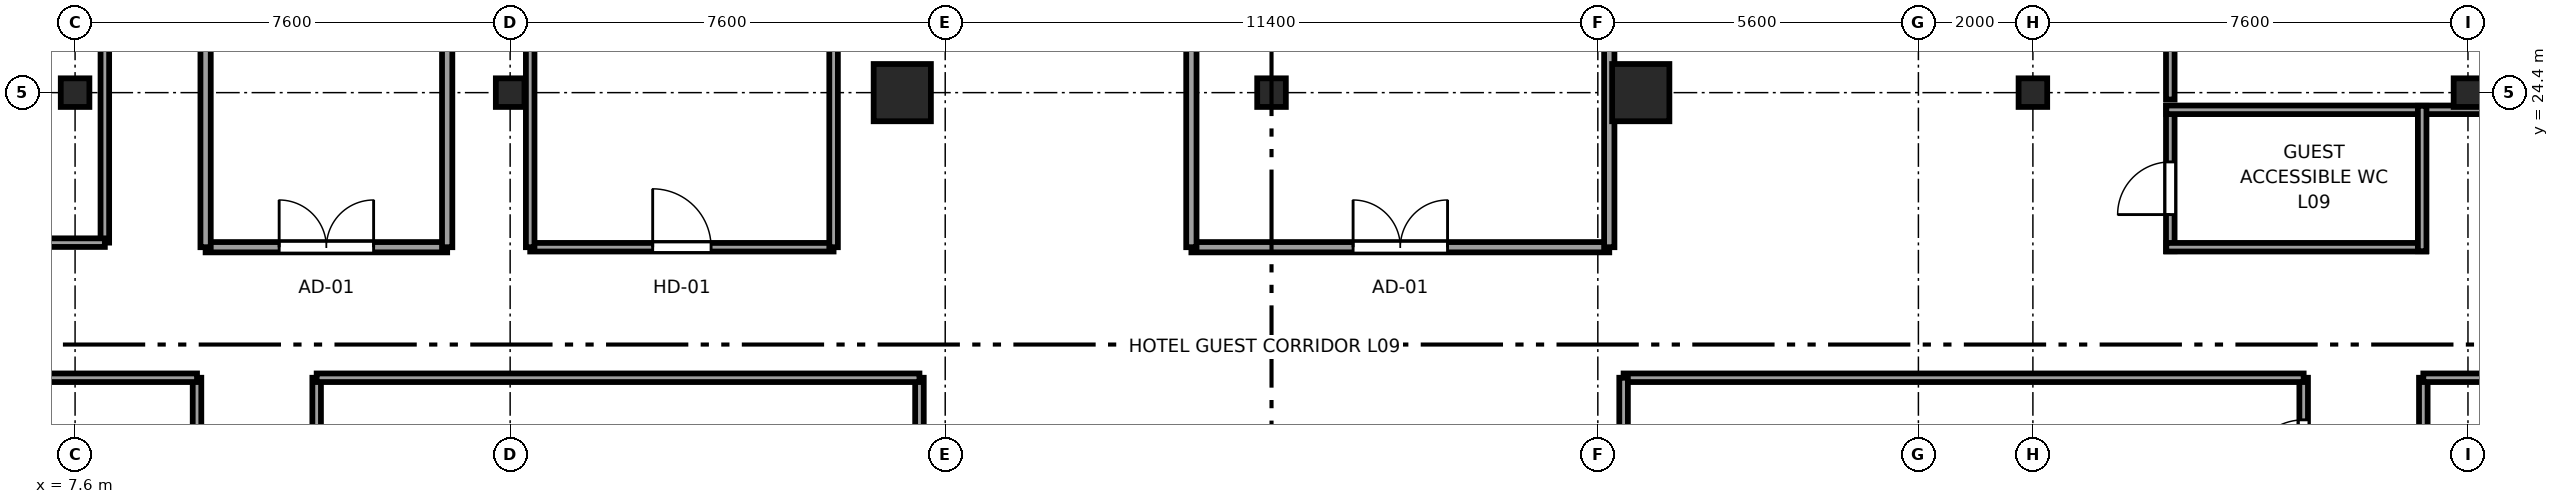
"""IFC4 building model, lengths in metres.
Left out: names, types, materials, properties, quantities, classifications, styles, units other than length and angle.
Written with IfcOpenShell. Run it as: python <this file> out.ifc"""

import sys

from ifc_helpers import new_model, si_unit, direction, frame, frame_2d, origin, origin_2d, place, context, subcontext, project, spatial, rectangle, i_section, extrude, source, transform, mapped, element, fill, save


model = new_model("IFC4")
c1 = context("Model", 3, precision=1e-05, world=origin(), true_north=direction((0.0, 1.0)))
c2 = subcontext(c1, "Body", "Model", "MODEL_VIEW")
j1 = project(units=[si_unit("LENGTHUNIT", "METRE"), si_unit("PLANEANGLEUNIT", "RADIAN")], contexts=[c1])
p1 = place(None, origin())
s1 = spatial("IfcSite", under=j1, at=p1, CompositionType="ELEMENT")
p2 = place(p1, origin())
s2 = spatial("IfcBuilding", under=s1, at=p2, CompositionType="ELEMENT")
p3 = place(p2, frame((0.0, 0.0, 42.65)))
s3 = spatial("IfcBuildingStorey", under=s2, at=p3, CompositionType="ELEMENT", Elevation=42.65)
m1 = source(origin(), c2, "Body", "SweptSolid", [
    extrude(i_section(OverallWidth=0.5, OverallDepth=0.5, WebThickness=0.028, FlangeThickness=0.045, at=origin_2d()), origin(), (0.0, 0.0, 1.0), 3.55),
])
for number, where, z_axis, x_axis in (
    (1, (7.6, 24.4, 0.0), (0.0, 0.0, 1.0), (1.0, 0.0, 0.0)),
    (2, (15.2, 24.4, 0.0), (0.0, 0.0, 1.0), (1.0, 0.0, 0.0)),
):
    element("IfcColumn", number, at=place(p3, frame(where, z_axis=z_axis, x_axis=x_axis)), inside=s3, PredefinedType="COLUMN", context=c2, shape_type="MappedRepresentation", body=[
        mapped(m1, transform((0.0, 0.0, 0.0), x_axis=(1.0, 0.0, 0.0), y_axis=(0.0, 1.0, 0.0), z_axis=(0.0, 0.0, 1.0), scale=1.0)),
    ])
m2 = source(origin(), c2, "Body", "SweptSolid", [
    extrude(rectangle(XDim=1.0, YDim=1.0, at=origin_2d()), origin(), (0.0, 0.0, 1.0), 3.55),
])
for number, where, z_axis, x_axis in (
    (3, (22.05, 24.4, 0.0), (0.0, 0.0, 1.0), (1.0, 0.0, 0.0)),
    (4, (34.95, 24.4, 0.0), (0.0, 0.0, 1.0), (1.0, 0.0, 0.0)),
):
    element("IfcColumn", number, at=place(p3, frame(where, z_axis=z_axis, x_axis=x_axis)), inside=s3, PredefinedType="COLUMN", context=c2, shape_type="MappedRepresentation", body=[
        mapped(m2, transform((0.0, 0.0, 0.0), x_axis=(1.0, 0.0, 0.0), y_axis=(0.0, 1.0, 0.0), z_axis=(0.0, 0.0, 1.0), scale=1.0)),
    ])
for number, where, z_axis, x_axis in (
    (5, (41.8, 24.4, 0.0), (0.0, 0.0, 1.0), (1.0, 0.0, 0.0)),
    (6, (49.4, 24.4, 0.0), (0.0, 0.0, 1.0), (1.0, 0.0, 0.0)),
    (7, (28.5, 24.4, 0.0), (0.0, 0.0, 1.0), (1.0, 0.0, 0.0)),
):
    element("IfcColumn", number, at=place(p3, frame(where, z_axis=z_axis, x_axis=x_axis)), inside=s3, PredefinedType="COLUMN", context=c2, shape_type="MappedRepresentation", body=[
        mapped(m1, transform((0.0, 0.0, 0.0), x_axis=(1.0, 0.0, 0.0), y_axis=(0.0, 1.0, 0.0), z_axis=(0.0, 0.0, 1.0), scale=1.0)),
    ])
p4 = place(p3, frame((9.73, 15.61, 0.0), z_axis=(0.0, 0.0, 1.0), x_axis=(0.0, 1.0, 0.0)))
e8 = element("IfcWall", 8, at=p4, inside=s3, PredefinedType="PARTITIONING", context=c2, shape_type="SweptSolid", body=[
    extrude(rectangle(XDim=3.81, YDim=0.15, at=frame_2d((1.905, 0.0))), origin(), (0.0, 0.0, 1.0), 3.37),
])
p5 = place(p4, frame((1.395, 0.0, 0.0)))
e9 = element("IfcOpeningElement", 9, at=p5, cuts=e8, PredefinedType="OPENING", context=c2, shape_type="SweptSolid", body=[
    extrude(rectangle(XDim=0.98, YDim=2.12, at=frame_2d((0.49, 1.06))), frame((0.0, 0.085, 0.0), z_axis=(0.0, -1.0, 0.0), x_axis=(1.0, 0.0, 0.0)), (0.0, 0.0, 1.0), 0.17),
])
p6 = place(p3, frame((0.405, 19.42, 0.0), z_axis=(0.0, 0.0, 1.0), x_axis=(1.0, 0.0, 0.0)))
e10 = element("IfcWall", 10, at=p6, inside=s3, PredefinedType="PARTITIONING", context=c2, shape_type="SweptSolid", body=[
    extrude(rectangle(XDim=9.325, YDim=0.15, at=frame_2d((4.663, 0.0))), origin(), (0.0, 0.0, 1.0), 3.37),
])
p7 = place(p3, frame((11.82, 16.81, 0.0), z_axis=(0.0, 0.0, 1.0), x_axis=(0.0, 1.0, 0.0)))
e11 = element("IfcWall", 11, at=p7, inside=s3, PredefinedType="PARTITIONING", context=c2, shape_type="SweptSolid", body=[
    extrude(rectangle(XDim=2.61, YDim=0.15, at=frame_2d((1.305, 0.0))), origin(), (0.0, 0.0, 1.0), 3.37),
])
p8 = place(p7, frame((0.795, 0.0, 0.0)))
e12 = element("IfcOpeningElement", 12, at=p8, cuts=e11, PredefinedType="OPENING", context=c2, shape_type="SweptSolid", body=[
    extrude(rectangle(XDim=0.98, YDim=2.12, at=frame_2d((0.49, 1.06))), frame((0.0, 0.085, 0.0), z_axis=(0.0, -1.0, 0.0), x_axis=(1.0, 0.0, 0.0)), (0.0, 0.0, 1.0), 0.17),
])
p9 = place(p3, frame((22.35, 14.88, 0.0), z_axis=(0.0, 0.0, 1.0), x_axis=(0.0, 1.0, 0.0)))
e13 = element("IfcWall", 13, at=p9, inside=s3, PredefinedType="PARTITIONING", context=c2, shape_type="SweptSolid", body=[
    extrude(rectangle(XDim=4.54, YDim=0.15, at=frame_2d((2.27, 0.0))), origin(), (0.0, 0.0, 1.0), 3.37),
])
p10 = place(p3, frame((11.82, 19.42, 0.0), z_axis=(0.0, 0.0, 1.0), x_axis=(1.0, 0.0, 0.0)))
e14 = element("IfcWall", 14, at=p10, inside=s3, PredefinedType="PARTITIONING", context=c2, shape_type="SweptSolid", body=[
    extrude(rectangle(XDim=10.53, YDim=0.15, at=frame_2d((5.265, 0.0))), origin(), (0.0, 0.0, 1.0), 3.37),
])
p11 = place(p3, frame((46.53, 17.01, 0.0), z_axis=(0.0, 0.0, 1.0), x_axis=(0.0, 1.0, 0.0)))
e15 = element("IfcWall", 15, at=p11, inside=s3, PredefinedType="PARTITIONING", context=c2, shape_type="SweptSolid", body=[
    extrude(rectangle(XDim=2.41, YDim=0.15, at=frame_2d((1.205, 0.0))), origin(), (0.0, 0.0, 1.0), 3.37),
])
p12 = place(p11, frame((0.695, 0.0, 0.0)))
e16 = element("IfcOpeningElement", 16, at=p12, cuts=e15, PredefinedType="OPENING", context=c2, shape_type="SweptSolid", body=[
    extrude(rectangle(XDim=0.98, YDim=2.12, at=frame_2d((0.49, 1.06))), frame((0.0, 0.085, 0.0), z_axis=(0.0, -1.0, 0.0), x_axis=(1.0, 0.0, 0.0)), (0.0, 0.0, 1.0), 0.17),
])
p13 = place(p3, frame((34.65, 19.42, 0.0), z_axis=(0.0, 0.0, 1.0), x_axis=(1.0, 0.0, 0.0)))
e17 = element("IfcWall", 17, at=p13, inside=s3, PredefinedType="PARTITIONING", context=c2, shape_type="SweptSolid", body=[
    extrude(rectangle(XDim=11.88, YDim=0.15, at=frame_2d((5.94, 0.0))), origin(), (0.0, 0.0, 1.0), 3.37),
])
p14 = place(p3, frame((34.65, 15.08, 0.0), z_axis=(0.0, 0.0, 1.0), x_axis=(0.0, 1.0, 0.0)))
e18 = element("IfcWall", 18, at=p14, inside=s3, PredefinedType="PARTITIONING", context=c2, shape_type="SweptSolid", body=[
    extrude(rectangle(XDim=4.34, YDim=0.15, at=frame_2d((2.17, 0.0))), origin(), (0.0, 0.0, 1.0), 3.37),
])
p15 = place(p3, frame((48.62, 15.41, 0.0), z_axis=(0.0, 0.0, 1.0), x_axis=(0.0, 1.0, 0.0)))
e19 = element("IfcWall", 19, at=p15, inside=s3, PredefinedType="PARTITIONING", context=c2, shape_type="SweptSolid", body=[
    extrude(rectangle(XDim=4.01, YDim=0.15, at=frame_2d((2.005, 0.0))), origin(), (0.0, 0.0, 1.0), 3.37),
])
p16 = place(p15, frame((1.795, 0.0, 0.0)))
e20 = element("IfcOpeningElement", 20, at=p16, cuts=e19, PredefinedType="OPENING", context=c2, shape_type="SweptSolid", body=[
    extrude(rectangle(XDim=0.98, YDim=2.12, at=frame_2d((0.49, 1.06))), frame((0.0, 0.085, 0.0), z_axis=(0.0, -1.0, 0.0), x_axis=(1.0, 0.0, 0.0)), (0.0, 0.0, 1.0), 0.17),
])
p17 = place(p3, frame((48.62, 19.42, 0.0), z_axis=(0.0, 0.0, 1.0), x_axis=(1.0, 0.0, 0.0)))
e21 = element("IfcWall", 21, at=p17, inside=s3, PredefinedType="PARTITIONING", context=c2, shape_type="SweptSolid", body=[
    extrude(rectangle(XDim=7.975, YDim=0.15, at=frame_2d((3.987, 0.0))), origin(), (0.0, 0.0, 1.0), 3.37),
])
p18 = place(p3, frame((8.12, 21.78, 0.0), z_axis=(0.0, 0.0, 1.0), x_axis=(0.0, 1.0, 0.0)))
e22 = element("IfcWall", 22, at=p18, inside=s3, PredefinedType="PARTITIONING", context=c2, shape_type="SweptSolid", body=[
    extrude(rectangle(XDim=5.24, YDim=0.15, at=frame_2d((2.62, 0.0))), origin(), (0.0, 0.0, 1.0), 3.37),
])
p19 = place(p18, frame((3.93, 0.0, 0.0)))
e23 = element("IfcOpeningElement", 23, at=p19, cuts=e22, PredefinedType="OPENING", context=c2, shape_type="SweptSolid", body=[
    extrude(rectangle(XDim=0.98, YDim=2.12, at=frame_2d((0.49, 1.06))), frame((0.0, 0.085, 0.0), z_axis=(0.0, -1.0, 0.0), x_axis=(1.0, 0.0, 0.0)), (0.0, 0.0, 1.0), 0.17),
])
p20 = place(p3, frame((0.405, 21.78, 0.0), z_axis=(0.0, 0.0, 1.0), x_axis=(1.0, 0.0, 0.0)))
e24 = element("IfcWall", 24, at=p20, inside=s3, PredefinedType="PARTITIONING", context=c2, shape_type="SweptSolid", body=[
    extrude(rectangle(XDim=7.715, YDim=0.15, at=frame_2d((3.857, 0.0))), origin(), (0.0, 0.0, 1.0), 3.37),
])
p21 = place(p3, frame((44.2, 21.63, 0.0), z_axis=(0.0, 0.0, 1.0), x_axis=(0.0, 1.0, 0.0)))
e25 = element("IfcWall", 25, at=p21, inside=s3, PredefinedType="PARTITIONING", context=c2, shape_type="SweptSolid", body=[
    extrude(rectangle(XDim=2.54, YDim=0.15, at=frame_2d((1.27, 0.0))), origin(), (0.0, 0.0, 1.0), 3.37),
])
p22 = place(p21, frame((0.64, 0.0, 0.0)))
e26 = element("IfcOpeningElement", 26, at=p22, cuts=e25, PredefinedType="OPENING", context=c2, shape_type="SweptSolid", body=[
    extrude(rectangle(XDim=0.92, YDim=2.01, at=frame_2d((0.46, 1.005))), frame((0.0, 0.085, 0.0), z_axis=(0.0, -1.0, 0.0), x_axis=(1.0, 0.0, 0.0)), (0.0, 0.0, 1.0), 0.17),
])
p23 = place(p3, frame((44.13, 21.7, 0.0), z_axis=(0.0, 0.0, 1.0), x_axis=(1.0, 0.0, 0.0)))
e27 = element("IfcWall", 27, at=p23, inside=s3, PredefinedType="PARTITIONING", context=c2, shape_type="SweptSolid", body=[
    extrude(rectangle(XDim=4.54, YDim=0.15, at=frame_2d((2.27, 0.0))), origin(), (0.0, 0.0, 1.0), 3.37),
])
p24 = place(p3, frame((44.13, 24.1, 0.0), z_axis=(0.0, 0.0, 1.0), x_axis=(1.0, 0.0, 0.0)))
e28 = element("IfcWall", 28, at=p24, inside=s3, PredefinedType="PARTITIONING", context=c2, shape_type="SweptSolid", body=[
    extrude(rectangle(XDim=12.465, YDim=0.15, at=frame_2d((6.232, 0.0))), origin(), (0.0, 0.0, 1.0), 3.37),
])
p25 = place(p3, frame((48.6, 21.63, 0.0), z_axis=(0.0, 0.0, 1.0), x_axis=(0.0, 1.0, 0.0)))
e29 = element("IfcWall", 29, at=p25, inside=s3, PredefinedType="PARTITIONING", context=c2, shape_type="SweptSolid", body=[
    extrude(rectangle(XDim=2.54, YDim=0.15, at=frame_2d((1.27, 0.0))), origin(), (0.0, 0.0, 1.0), 3.37),
])
p26 = place(p3, frame((44.2, 24.28, 0.0), z_axis=(0.0, 0.0, 1.0), x_axis=(0.0, 1.0, 0.0)))
e30 = element("IfcWall", 30, at=p26, inside=s3, PredefinedType="PARTITIONING", context=c2, shape_type="SweptSolid", body=[
    extrude(rectangle(XDim=3.52, YDim=0.15, at=frame_2d((1.76, 0.0))), origin(), (0.0, 0.0, 1.0), 3.37),
])
p27 = place(p26, frame((0.935, 0.0, 0.0)))
e31 = element("IfcOpeningElement", 31, at=p27, cuts=e30, PredefinedType="OPENING", context=c2, shape_type="SweptSolid", body=[
    extrude(rectangle(XDim=1.65, YDim=2.15, at=frame_2d((0.825, 1.075))), frame((0.0, 0.085, 0.0), z_axis=(0.0, -1.0, 0.0), x_axis=(1.0, 0.0, 0.0)), (0.0, 0.0, 1.0), 0.17),
])
p28 = place(p3, frame((9.88, 21.7, 0.0), z_axis=(0.0, 0.0, 1.0), x_axis=(1.0, 0.0, 0.0)))
e32 = element("IfcWall", 32, at=p28, inside=s3, PredefinedType="PARTITIONING", context=c2, shape_type="SweptSolid", body=[
    extrude(rectangle(XDim=4.22, YDim=0.18, at=frame_2d((2.11, 0.0))), origin(), (0.0, 0.0, 1.0), 3.37),
])
p29 = place(p28, frame((1.285, 0.0, 0.0)))
e33 = element("IfcOpeningElement", 33, at=p29, cuts=e32, PredefinedType="OPENING", context=c2, shape_type="SweptSolid", body=[
    extrude(rectangle(XDim=1.65, YDim=2.15, at=frame_2d((0.825, 1.075))), frame((0.0, 0.1, 0.0), z_axis=(0.0, -1.0, 0.0), x_axis=(1.0, 0.0, 0.0)), (0.0, 0.0, 1.0), 0.2),
])
for number, where, z_axis, x_axis in (
    (34, (9.88, 21.7, 0.0), (0.0, 0.0, 1.0), (0.0, 1.0, 0.0)),
    (35, (14.1, 21.7, 0.0), (0.0, 0.0, 1.0), (0.0, 1.0, 0.0)),
):
    element("IfcWall", number, at=place(p3, frame(where, z_axis=z_axis, x_axis=x_axis)), inside=s3, PredefinedType="PARTITIONING", context=c2, shape_type="SweptSolid", body=[
        extrude(rectangle(XDim=8.05, YDim=0.18, at=frame_2d((4.025, 0.0))), origin(), (0.0, 0.0, 1.0), 3.37),
    ])
p30 = place(p3, frame((27.1, 21.7, 0.0), z_axis=(0.0, 0.0, 1.0), x_axis=(1.0, 0.0, 0.0)))
e36 = element("IfcWall", 36, at=p30, inside=s3, PredefinedType="PARTITIONING", context=c2, shape_type="SweptSolid", body=[
    extrude(rectangle(XDim=7.3, YDim=0.18, at=frame_2d((3.65, 0.0))), origin(), (0.0, 0.0, 1.0), 3.37),
])
p31 = place(p30, frame((2.825, 0.0, 0.0)))
e37 = element("IfcOpeningElement", 37, at=p31, cuts=e36, PredefinedType="OPENING", context=c2, shape_type="SweptSolid", body=[
    extrude(rectangle(XDim=1.65, YDim=2.15, at=frame_2d((0.825, 1.075))), frame((0.0, 0.1, 0.0), z_axis=(0.0, -1.0, 0.0), x_axis=(1.0, 0.0, 0.0)), (0.0, 0.0, 1.0), 0.2),
])
for number, where, z_axis, x_axis in (
    (38, (27.1, 21.7, 0.0), (0.0, 0.0, 1.0), (0.0, 1.0, 0.0)),
    (39, (34.4, 21.7, 0.0), (0.0, 0.0, 1.0), (0.0, 1.0, 0.0)),
):
    element("IfcWall", number, at=place(p3, frame(where, z_axis=z_axis, x_axis=x_axis)), inside=s3, PredefinedType="PARTITIONING", context=c2, shape_type="SweptSolid", body=[
        extrude(rectangle(XDim=8.1, YDim=0.18, at=frame_2d((4.05, 0.0))), origin(), (0.0, 0.0, 1.0), 3.37),
    ])
p32 = place(p3, frame((15.55, 21.7, 0.0), z_axis=(0.0, 0.0, 1.0), x_axis=(1.0, 0.0, 0.0)))
e40 = element("IfcWall", 40, at=p32, inside=s3, PredefinedType="PARTITIONING", context=c2, shape_type="SweptSolid", body=[
    extrude(rectangle(XDim=5.3, YDim=0.15, at=frame_2d((2.65, 0.0))), origin(), (0.0, 0.0, 1.0), 3.37),
])
p33 = place(p32, frame((2.14, 0.0, 0.0)))
e41 = element("IfcOpeningElement", 41, at=p33, cuts=e40, PredefinedType="OPENING", context=c2, shape_type="SweptSolid", body=[
    extrude(rectangle(XDim=1.02, YDim=2.03, at=frame_2d((0.51, 1.015))), frame((0.0, 0.085, 0.0), z_axis=(0.0, -1.0, 0.0), x_axis=(1.0, 0.0, 0.0)), (0.0, 0.0, 1.0), 0.17),
])
for number, where, z_axis, x_axis in (
    (42, (15.55, 21.7, 0.0), (0.0, 0.0, 1.0), (0.0, 1.0, 0.0)),
    (43, (20.85, 21.7, 0.0), (0.0, 0.0, 1.0), (0.0, 1.0, 0.0)),
):
    element("IfcWall", number, at=place(p3, frame(where, z_axis=z_axis, x_axis=x_axis)), inside=s3, PredefinedType="PARTITIONING", context=c2, shape_type="SweptSolid", body=[
        extrude(rectangle(XDim=8.1, YDim=0.15, at=frame_2d((4.05, 0.0))), origin(), (0.0, 0.0, 1.0), 3.37),
    ])
m3 = source(origin(), c2, "Body", "SweptSolid", [
    extrude(rectangle(XDim=0.98, YDim=2.12, at=frame_2d((0.49, 1.06))), frame((0.0, 0.025, 0.0), z_axis=(0.0, -1.0, 0.0), x_axis=(1.0, 0.0, 0.0)), (0.0, 0.0, 1.0), 0.05),
])
p34 = place(p12, origin())
e44 = element("IfcDoor", 44, at=p34, inside=s3, OperationType="SINGLE_SWING_LEFT", PredefinedType="DOOR", context=c2, shape_type="MappedRepresentation", body=[
    mapped(m3, transform((0.0, 0.0, 0.0), x_axis=(1.0, 0.0, 0.0), y_axis=(0.0, 1.0, 0.0), z_axis=(0.0, 0.0, 1.0), scale=1.0)),
])
fill(e16, e44)
m4 = source(origin(), c2, "Body", "SweptSolid", [
    extrude(rectangle(XDim=0.92, YDim=2.01, at=frame_2d((0.46, 1.005))), frame((0.0, 0.025, 0.0), z_axis=(0.0, -1.0, 0.0), x_axis=(1.0, 0.0, 0.0)), (0.0, 0.0, 1.0), 0.05),
])
p35 = place(p22, origin())
e45 = element("IfcDoor", 45, at=p35, inside=s3, OperationType="SINGLE_SWING_LEFT", PredefinedType="DOOR", context=c2, shape_type="MappedRepresentation", body=[
    mapped(m4, transform((0.0, 0.0, 0.0), x_axis=(1.0, 0.0, 0.0), y_axis=(0.0, 1.0, 0.0), z_axis=(0.0, 0.0, 1.0), scale=1.0)),
])
fill(e26, e45)
m5 = source(origin(), c2, "Body", "SweptSolid", [
    extrude(rectangle(XDim=1.65, YDim=2.15, at=frame_2d((0.825, 1.075))), frame((0.0, 0.025, 0.0), z_axis=(0.0, -1.0, 0.0), x_axis=(1.0, 0.0, 0.0)), (0.0, 0.0, 1.0), 0.05),
])
p36 = place(p29, origin())
e46 = element("IfcDoor", 46, at=p36, inside=s3, OperationType="DOUBLE_DOOR_SINGLE_SWING", PredefinedType="DOOR", context=c2, shape_type="MappedRepresentation", body=[
    mapped(m5, transform((0.0, 0.0, 0.0), x_axis=(1.0, 0.0, 0.0), y_axis=(0.0, 1.0, 0.0), z_axis=(0.0, 0.0, 1.0), scale=1.0)),
])
fill(e33, e46)
p37 = place(p31, origin())
e47 = element("IfcDoor", 47, at=p37, inside=s3, OperationType="DOUBLE_DOOR_SINGLE_SWING", PredefinedType="DOOR", context=c2, shape_type="MappedRepresentation", body=[
    mapped(m5, transform((0.0, 0.0, 0.0), x_axis=(1.0, 0.0, 0.0), y_axis=(0.0, 1.0, 0.0), z_axis=(0.0, 0.0, 1.0), scale=1.0)),
])
fill(e37, e47)
m6 = source(origin(), c2, "Body", "SweptSolid", [
    extrude(rectangle(XDim=1.02, YDim=2.03, at=frame_2d((0.51, 1.015))), frame((0.0, 0.025, 0.0), z_axis=(0.0, -1.0, 0.0), x_axis=(1.0, 0.0, 0.0)), (0.0, 0.0, 1.0), 0.05),
])
p38 = place(p33, origin())
e48 = element("IfcDoor", 48, at=p38, inside=s3, OperationType="SINGLE_SWING_LEFT", PredefinedType="DOOR", context=c2, shape_type="MappedRepresentation", body=[
    mapped(m6, transform((0.0, 0.0, 0.0), x_axis=(1.0, 0.0, 0.0), y_axis=(0.0, 1.0, 0.0), z_axis=(0.0, 0.0, 1.0), scale=1.0)),
])
fill(e41, e48)
save(model, sys.argv[1])
